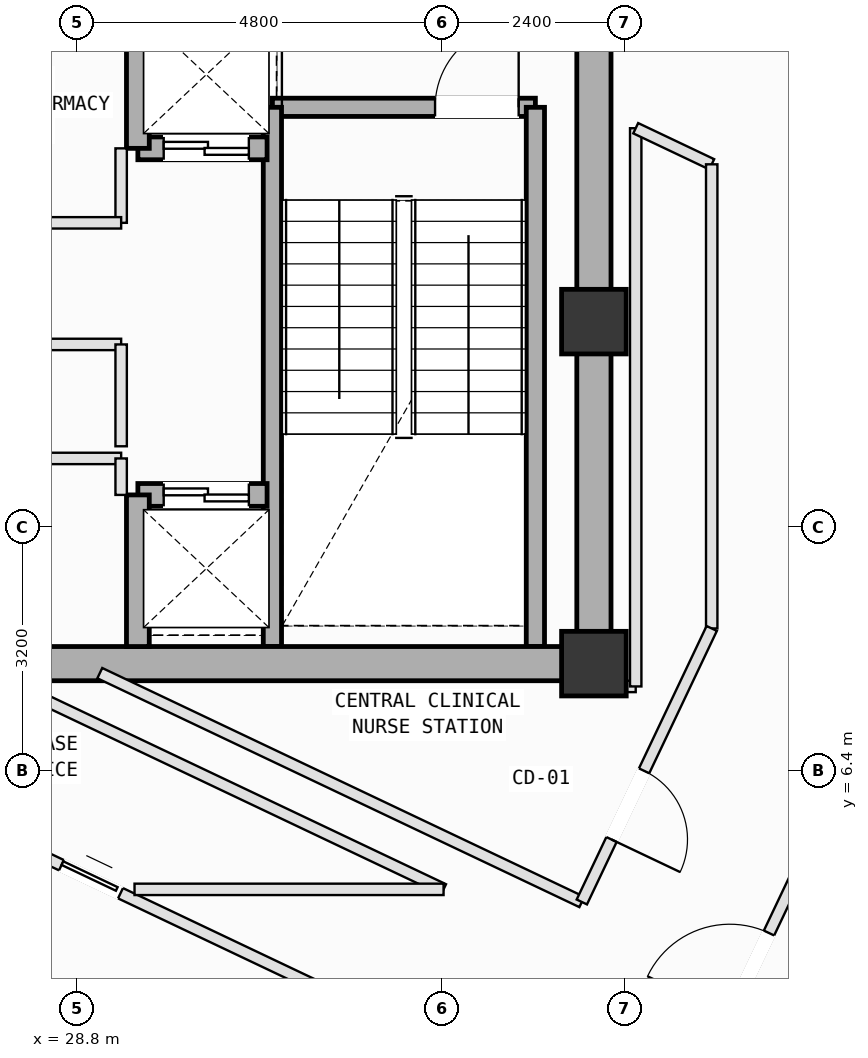
"""IFC4 building model, lengths in metres.
Left out: names, types, materials, properties, quantities, classifications, styles, units other than length and angle.
Written with IfcOpenShell. Run it as: python <this file> out.ifc"""

import sys

from ifc_helpers import new_model, si_unit, direction, frame, frame_2d, origin, origin_2d, place, context, subcontext, project, spatial, rectangle, extrude, element, fill, save


model = new_model("IFC4")
c1 = context("Model", 3, precision=1e-05, world=origin(), true_north=direction((0.0, 1.0)))
c2 = subcontext(c1, "Body", "Model", "MODEL_VIEW")
j1 = project(units=[si_unit("LENGTHUNIT", "METRE"), si_unit("PLANEANGLEUNIT", "RADIAN")], contexts=[c1])
p1 = place(None, origin())
s1 = spatial("IfcSite", under=j1, at=p1, CompositionType="ELEMENT")
p2 = place(p1, origin())
s2 = spatial("IfcBuilding", under=s1, at=p2, CompositionType="ELEMENT")
p3 = place(p2, frame((0.0, 0.0, 300.6)))
s3 = spatial("IfcBuildingStorey", under=s2, at=p3, CompositionType="ELEMENT", Elevation=300.6)
for number, where, z_axis, x_axis in (
    (1, (35.6, 7.8, 0.0), (0.0, 0.0, 1.0), (1.0, 0.0, 0.0)),
    (2, (35.6, 12.3, 0.0), (0.0, 0.0, 1.0), (1.0, 0.0, 0.0)),
):
    element("IfcColumn", number, at=place(p3, frame(where, z_axis=z_axis, x_axis=x_axis)), inside=s3, PredefinedType="COLUMN", context=c2, shape_type="SweptSolid", body=[
        extrude(rectangle(XDim=0.85, YDim=0.85, at=origin_2d()), origin(), (0.0, 0.0, 1.0), 4.0),
    ])
p4 = place(p3, frame((31.37, 15.12, 0.0), z_axis=(0.0, 0.0, 1.0), x_axis=(1.0, 0.0, 0.0)))
e3 = element("IfcWall", 3, at=p4, inside=s3, PredefinedType="SOLIDWALL", context=c2, shape_type="SweptSolid", body=[
    extrude(rectangle(XDim=3.46, YDim=0.24, at=frame_2d((1.73, 0.0))), origin(), (0.0, 0.0, 1.0), 3.78),
])
p5 = place(p4, frame((2.14, 0.0, 0.0)))
e4 = element("IfcOpeningElement", 4, at=p5, cuts=e3, PredefinedType="OPENING", context=c2, shape_type="SweptSolid", body=[
    extrude(rectangle(XDim=1.1, YDim=2.15, at=frame_2d((0.55, 1.075))), frame((0.0, 0.13, 0.0), z_axis=(0.0, -1.0, 0.0), x_axis=(1.0, 0.0, 0.0)), (0.0, 0.0, 1.0), 0.26),
])
for number, where, z_axis, x_axis in (
    (5, (34.83, 15.12, 0.0), (0.0, 0.0, 1.0), (0.0, -1.0, 0.0)),
    (6, (31.37, 8.025, 0.0), (0.0, 0.0, 1.0), (0.0, 1.0, 0.0)),
):
    element("IfcWall", number, at=place(p3, frame(where, z_axis=z_axis, x_axis=x_axis)), inside=s3, PredefinedType="SOLIDWALL", context=c2, shape_type="SweptSolid", body=[
        extrude(rectangle(XDim=7.095, YDim=0.24, at=frame_2d((3.548, 0.0))), origin(), (0.0, 0.0, 1.0), 3.78),
    ])
p6 = place(p3, frame((24.8, 7.8, 0.0), z_axis=(0.0, 0.0, 1.0), x_axis=(1.0, 0.0, 0.0)))
e7 = element("IfcWall", 7, at=p6, inside=s3, PredefinedType="SHEAR", context=c2, shape_type="SweptSolid", body=[
    extrude(rectangle(XDim=10.8, YDim=0.45, at=frame_2d((5.4, 0.0))), origin(), (0.0, 0.0, 1.0), 3.78),
])
p7 = place(p3, frame((35.6, 7.8, 0.0), z_axis=(0.0, 0.0, 1.0), x_axis=(0.0, 1.0, 0.0)))
e8 = element("IfcWall", 8, at=p7, inside=s3, PredefinedType="SHEAR", context=c2, shape_type="SweptSolid", body=[
    extrude(rectangle(XDim=9.0, YDim=0.45, at=frame_2d((4.5, 0.0))), origin(), (0.0, 0.0, 1.0), 3.78),
])
p8 = place(p3, frame((29.6, 10.02, 0.0), z_axis=(0.0, 0.0, 1.0), x_axis=(1.0, 0.0, 0.0)))
e9 = element("IfcWall", 9, at=p8, inside=s3, PredefinedType="SOLIDWALL", context=c2, shape_type="SweptSolid", body=[
    extrude(rectangle(XDim=1.7, YDim=0.3, at=frame_2d((0.85, 0.0))), origin(), (0.0, 0.0, 1.0), 3.78),
])
p9 = place(p8, frame((0.34, 0.0, 0.0)))
e10 = element("IfcOpeningElement", 10, at=p9, cuts=e9, PredefinedType="OPENING", context=c2, shape_type="SweptSolid", body=[
    extrude(rectangle(XDim=1.12, YDim=2.15, at=frame_2d((0.56, 1.075))), frame((0.0, 0.16, 0.0), z_axis=(0.0, -1.0, 0.0), x_axis=(1.0, 0.0, 0.0)), (0.0, 0.0, 1.0), 0.32),
])
p10 = place(p3, frame((29.6, 8.025, 0.0), z_axis=(0.0, 0.0, 1.0), x_axis=(0.0, 1.0, 0.0)))
e11 = element("IfcWall", 11, at=p10, inside=s3, PredefinedType="SOLIDWALL", context=c2, shape_type="SweptSolid", body=[
    extrude(rectangle(XDim=1.995, YDim=0.3, at=frame_2d((0.998, 0.0))), origin(), (0.0, 0.0, 1.0), 3.78),
])
p11 = place(p3, frame((29.6, 14.58, 0.0), z_axis=(0.0, 0.0, 1.0), x_axis=(1.0, 0.0, 0.0)))
e12 = element("IfcWall", 12, at=p11, inside=s3, PredefinedType="SOLIDWALL", context=c2, shape_type="SweptSolid", body=[
    extrude(rectangle(XDim=1.7, YDim=0.3, at=frame_2d((0.85, 0.0))), origin(), (0.0, 0.0, 1.0), 3.78),
])
p12 = place(p11, frame((0.34, 0.0, 0.0)))
e13 = element("IfcOpeningElement", 13, at=p12, cuts=e12, PredefinedType="OPENING", context=c2, shape_type="SweptSolid", body=[
    extrude(rectangle(XDim=1.12, YDim=2.15, at=frame_2d((0.56, 1.075))), frame((0.0, 0.16, 0.0), z_axis=(0.0, -1.0, 0.0), x_axis=(1.0, 0.0, 0.0)), (0.0, 0.0, 1.0), 0.32),
])
p13 = place(p3, frame((29.6, 14.58, 0.0), z_axis=(0.0, 0.0, 1.0), x_axis=(0.0, 1.0, 0.0)))
e14 = element("IfcWall", 14, at=p13, inside=s3, PredefinedType="SOLIDWALL", context=c2, shape_type="SweptSolid", body=[
    extrude(rectangle(XDim=2.22, YDim=0.3, at=frame_2d((1.11, 0.0))), origin(), (0.0, 0.0, 1.0), 3.78),
])
p14 = place(p3, frame((25.98, 10.5, 0.0), z_axis=(0.0, 0.0, 1.0), x_axis=(1.0, 0.0, 0.0)))
e15 = element("IfcWall", 15, at=p14, inside=s3, PredefinedType="PARTITIONING", context=c2, shape_type="SweptSolid", body=[
    extrude(rectangle(XDim=3.4, YDim=0.15, at=frame_2d((1.7, 0.0))), origin(), (0.0, 0.0, 1.0), 3.78),
])
p15 = place(p3, frame((29.38, 10.5, 0.0), z_axis=(0.0, 0.0, 1.0), x_axis=(0.0, -1.0, 0.0)))
e16 = element("IfcWall", 16, at=p15, inside=s3, PredefinedType="PARTITIONING", context=c2, shape_type="SweptSolid", body=[
    extrude(rectangle(XDim=0.48, YDim=0.15, at=frame_2d((0.24, 0.0))), origin(), (0.0, 0.0, 1.0), 3.78),
])
p16 = place(p3, frame((25.98, 12.0, 0.0), z_axis=(0.0, 0.0, 1.0), x_axis=(1.0, 0.0, 0.0)))
e17 = element("IfcWall", 17, at=p16, inside=s3, PredefinedType="PARTITIONING", context=c2, shape_type="SweptSolid", body=[
    extrude(rectangle(XDim=3.4, YDim=0.15, at=frame_2d((1.7, 0.0))), origin(), (0.0, 0.0, 1.0), 3.78),
])
p17 = place(p16, frame((1.24, 0.0, 0.0)))
e18 = element("IfcOpeningElement", 18, at=p17, cuts=e17, PredefinedType="OPENING", context=c2, shape_type="SweptSolid", body=[
    extrude(rectangle(XDim=0.92, YDim=2.1, at=frame_2d((0.46, 1.05))), frame((0.0, 0.085, 0.0), z_axis=(0.0, -1.0, 0.0), x_axis=(1.0, 0.0, 0.0)), (0.0, 0.0, 1.0), 0.17),
])
p18 = place(p3, frame((29.38, 12.0, 0.0), z_axis=(0.0, 0.0, 1.0), x_axis=(0.0, -1.0, 0.0)))
e19 = element("IfcWall", 19, at=p18, inside=s3, PredefinedType="PARTITIONING", context=c2, shape_type="SweptSolid", body=[
    extrude(rectangle(XDim=1.34, YDim=0.15, at=frame_2d((0.67, 0.0))), origin(), (0.0, 0.0, 1.0), 3.78),
])
p19 = place(p3, frame((29.38, 14.58, 0.0), z_axis=(0.0, 0.0, 1.0), x_axis=(0.0, -1.0, 0.0)))
e20 = element("IfcWall", 20, at=p19, inside=s3, PredefinedType="PARTITIONING", context=c2, shape_type="SweptSolid", body=[
    extrude(rectangle(XDim=0.98, YDim=0.15, at=frame_2d((0.49, 0.0))), origin(), (0.0, 0.0, 1.0), 3.78),
])
p20 = place(p3, frame((29.38, 13.6, 0.0), z_axis=(0.0, 0.0, 1.0), x_axis=(-1.0, 0.0, 0.0)))
e21 = element("IfcWall", 21, at=p20, inside=s3, PredefinedType="PARTITIONING", context=c2, shape_type="SweptSolid", body=[
    extrude(rectangle(XDim=3.2, YDim=0.15, at=frame_2d((1.6, 0.0))), origin(), (0.0, 0.0, 1.0), 3.78),
])
p21 = place(p20, frame((1.1, 0.0, 0.0)))
e22 = element("IfcOpeningElement", 22, at=p21, cuts=e21, PredefinedType="OPENING", context=c2, shape_type="SweptSolid", body=[
    extrude(rectangle(XDim=1.0, YDim=2.12, at=frame_2d((0.5, 1.06))), frame((0.0, 0.085, 0.0), z_axis=(0.0, -1.0, 0.0), x_axis=(1.0, 0.0, 0.0)), (0.0, 0.0, 1.0), 0.17),
])
p22 = place(p3, frame((36.955, 2.257, 0.0), z_axis=(0.0, 0.0, 1.0), x_axis=(0.428857570824, 0.903372118203, 0.0)))
e23 = element("IfcWall", 23, at=p22, inside=s3, PredefinedType="PARTITIONING", context=c2, shape_type="SweptSolid", body=[
    extrude(rectangle(XDim=3.224, YDim=0.15, at=frame_2d((1.612, 0.0))), origin(), (0.0, 0.0, 1.0), 3.78),
])
p23 = place(p22, frame((1.012, 0.0, 0.0)))
e24 = element("IfcOpeningElement", 24, at=p23, cuts=e23, PredefinedType="OPENING", context=c2, shape_type="SweptSolid", body=[
    extrude(rectangle(XDim=1.2, YDim=2.15, at=frame_2d((0.6, 1.075))), frame((0.0, 0.085, 0.0), z_axis=(0.0, -1.0, 0.0), x_axis=(1.0, 0.0, 0.0)), (0.0, 0.0, 1.0), 0.17),
])
p24 = place(p3, frame((27.752, 5.548, 0.0), z_axis=(0.0, 0.0, 1.0), x_axis=(0.903324453773, -0.42895795973, 0.0)))
e25 = element("IfcWall", 25, at=p24, inside=s3, PredefinedType="PARTITIONING", context=c2, shape_type="SweptSolid", body=[
    extrude(rectangle(XDim=7.355, YDim=0.15, at=frame_2d((3.677, 0.0))), origin(), (0.0, 0.0, 1.0), 3.78),
])
p25 = place(p24, frame((0.933, 0.0, 0.0)))
e26 = element("IfcOpeningElement", 26, at=p25, cuts=e25, PredefinedType="OPENING", context=c2, shape_type="SweptSolid", body=[
    extrude(rectangle(XDim=0.86, YDim=2.06, at=frame_2d((0.43, 1.03))), frame((0.0, 0.085, 0.0), z_axis=(0.0, -1.0, 0.0), x_axis=(1.0, 0.0, 0.0)), (0.0, 0.0, 1.0), 0.17),
])
p26 = place(p3, frame((35.441, 4.664, 0.0), z_axis=(0.0, 0.0, 1.0), x_axis=(-0.903352966439, 0.42889791096, 0.0)))
e27 = element("IfcWall", 27, at=p26, inside=s3, PredefinedType="PARTITIONING", context=c2, shape_type="SweptSolid", body=[
    extrude(rectangle(XDim=7.02, YDim=0.15, at=frame_2d((3.51, 0.0))), origin(), (0.0, 0.0, 1.0), 3.78),
])
p27 = place(p3, frame((35.6, 7.5, 0.0), z_axis=(0.0, 0.0, 1.0), x_axis=(1.0, 0.0, 0.0)))
e28 = element("IfcWall", 28, at=p27, inside=s3, PredefinedType="PARTITIONING", context=c2, shape_type="SweptSolid", body=[
    extrude(rectangle(XDim=0.55, YDim=0.15, at=frame_2d((0.275, 0.0))), origin(), (0.0, 0.0, 1.0), 3.165),
])
p28 = place(p3, frame((36.15, 7.5, 0.0), z_axis=(0.0, 0.0, 1.0), x_axis=(0.0, 1.0, 0.0)))
e29 = element("IfcWall", 29, at=p28, inside=s3, PredefinedType="PARTITIONING", context=c2, shape_type="SweptSolid", body=[
    extrude(rectangle(XDim=7.345, YDim=0.15, at=frame_2d((3.672, 0.0))), origin(), (0.0, 0.0, 1.0), 3.78),
])
p29 = place(p3, frame((36.15, 14.845, 0.0), z_axis=(0.0, 0.0, 1.0), x_axis=(0.90332878087, -0.428948847361, 0.0)))
e30 = element("IfcWall", 30, at=p29, inside=s3, PredefinedType="PARTITIONING", context=c2, shape_type="SweptSolid", body=[
    extrude(rectangle(XDim=1.107, YDim=0.15, at=frame_2d((0.553, 0.0))), origin(), (0.0, 0.0, 1.0), 3.78),
])
p30 = place(p3, frame((37.15, 14.37, 0.0), z_axis=(0.0, 0.0, 1.0), x_axis=(0.0, -1.0, 0.0)))
e31 = element("IfcWall", 31, at=p30, inside=s3, PredefinedType="PARTITIONING", context=c2, shape_type="SweptSolid", body=[
    extrude(rectangle(XDim=6.107, YDim=0.15, at=frame_2d((3.054, 0.0))), origin(), (0.0, 0.0, 1.0), 3.78),
])
p31 = place(p3, frame((37.15, 8.263, 0.0), z_axis=(0.0, 0.0, 1.0), x_axis=(-0.428958064464, -0.903324404038, 0.0)))
e32 = element("IfcWall", 32, at=p31, inside=s3, PredefinedType="PARTITIONING", context=c2, shape_type="SweptSolid", body=[
    extrude(rectangle(XDim=3.984, YDim=0.15, at=frame_2d((1.992, 0.0))), origin(), (0.0, 0.0, 1.0), 3.78),
])
p32 = place(p31, frame((2.074, 0.0, 0.0)))
e33 = element("IfcOpeningElement", 33, at=p32, cuts=e32, PredefinedType="OPENING", context=c2, shape_type="SweptSolid", body=[
    extrude(rectangle(XDim=1.0, YDim=2.12, at=frame_2d((0.5, 1.06))), frame((0.0, 0.085, 0.0), z_axis=(0.0, -1.0, 0.0), x_axis=(1.0, 0.0, 0.0)), (0.0, 0.0, 1.0), 0.17),
])
p33 = place(p3, frame((27.63, 7.675, 0.0), z_axis=(0.0, 0.0, 1.0), x_axis=(0.903354516737, -0.428894645678, 0.0)))
e34 = element("IfcWall", 34, at=p33, inside=s3, PredefinedType="PARTITIONING", context=c2, shape_type="SweptSolid", body=[
    extrude(rectangle(XDim=6.633, YDim=0.15, at=frame_2d((3.317, 0.0))), origin(), (0.0, 0.0, 1.0), 3.78),
])
p34 = place(p3, frame((33.622, 4.83, 0.0), z_axis=(0.0, 0.0, 1.0), x_axis=(-1.0, 0.0, 0.0)))
e35 = element("IfcWall", 35, at=p34, inside=s3, PredefinedType="PARTITIONING", context=c2, shape_type="SweptSolid", body=[
    extrude(rectangle(XDim=4.066, YDim=0.15, at=frame_2d((2.033, 0.0))), origin(), (0.0, 0.0, 1.0), 3.78),
])
p35 = place(p5, origin())
e36 = element("IfcDoor", 36, at=p35, inside=s3, OperationType="SINGLE_SWING_RIGHT", PredefinedType="DOOR", context=c2, shape_type="SweptSolid", body=[
    extrude(rectangle(XDim=1.1, YDim=2.15, at=frame_2d((0.55, 1.075))), frame((0.0, 0.025, 0.0), z_axis=(0.0, -1.0, 0.0), x_axis=(1.0, 0.0, 0.0)), (0.0, 0.0, 1.0), 0.05),
])
fill(e4, e36)
p36 = place(p9, origin())
e37 = element("IfcDoor", 37, at=p36, inside=s3, OperationType="DOUBLE_DOOR_SLIDING", PredefinedType="DOOR", context=c2, shape_type="SweptSolid", body=[
    extrude(rectangle(XDim=1.12, YDim=2.15, at=frame_2d((0.56, 1.075))), frame((0.0, 0.025, 0.0), z_axis=(0.0, -1.0, 0.0), x_axis=(1.0, 0.0, 0.0)), (0.0, 0.0, 1.0), 0.05),
])
fill(e10, e37)
p37 = place(p12, origin())
e38 = element("IfcDoor", 38, at=p37, inside=s3, OperationType="DOUBLE_DOOR_SLIDING", PredefinedType="DOOR", context=c2, shape_type="SweptSolid", body=[
    extrude(rectangle(XDim=1.12, YDim=2.15, at=frame_2d((0.56, 1.075))), frame((0.0, 0.025, 0.0), z_axis=(0.0, -1.0, 0.0), x_axis=(1.0, 0.0, 0.0)), (0.0, 0.0, 1.0), 0.05),
])
fill(e13, e38)
p38 = place(p23, origin())
e39 = element("IfcDoor", 39, at=p38, inside=s3, OperationType="SINGLE_SWING_LEFT", PredefinedType="DOOR", context=c2, shape_type="SweptSolid", body=[
    extrude(rectangle(XDim=1.2, YDim=2.15, at=frame_2d((0.6, 1.075))), frame((0.0, 0.025, 0.0), z_axis=(0.0, -1.0, 0.0), x_axis=(1.0, 0.0, 0.0)), (0.0, 0.0, 1.0), 0.05),
])
fill(e24, e39)
p39 = place(p32, origin())
e40 = element("IfcDoor", 40, at=p39, inside=s3, OperationType="SINGLE_SWING_RIGHT", PredefinedType="DOOR", context=c2, shape_type="SweptSolid", body=[
    extrude(rectangle(XDim=1.0, YDim=2.12, at=frame_2d((0.5, 1.06))), frame((0.0, 0.025, 0.0), z_axis=(0.0, -1.0, 0.0), x_axis=(1.0, 0.0, 0.0)), (0.0, 0.0, 1.0), 0.05),
])
fill(e33, e40)
p40 = place(p25, origin())
e41 = element("IfcDoor", 41, at=p40, inside=s3, OperationType="SLIDING_TO_LEFT", PredefinedType="DOOR", context=c2, shape_type="SweptSolid", body=[
    extrude(rectangle(XDim=0.86, YDim=2.06, at=frame_2d((0.43, 1.03))), frame((0.0, 0.025, 0.0), z_axis=(0.0, -1.0, 0.0), x_axis=(1.0, 0.0, 0.0)), (0.0, 0.0, 1.0), 0.05),
])
fill(e26, e41)
save(model, sys.argv[1])
